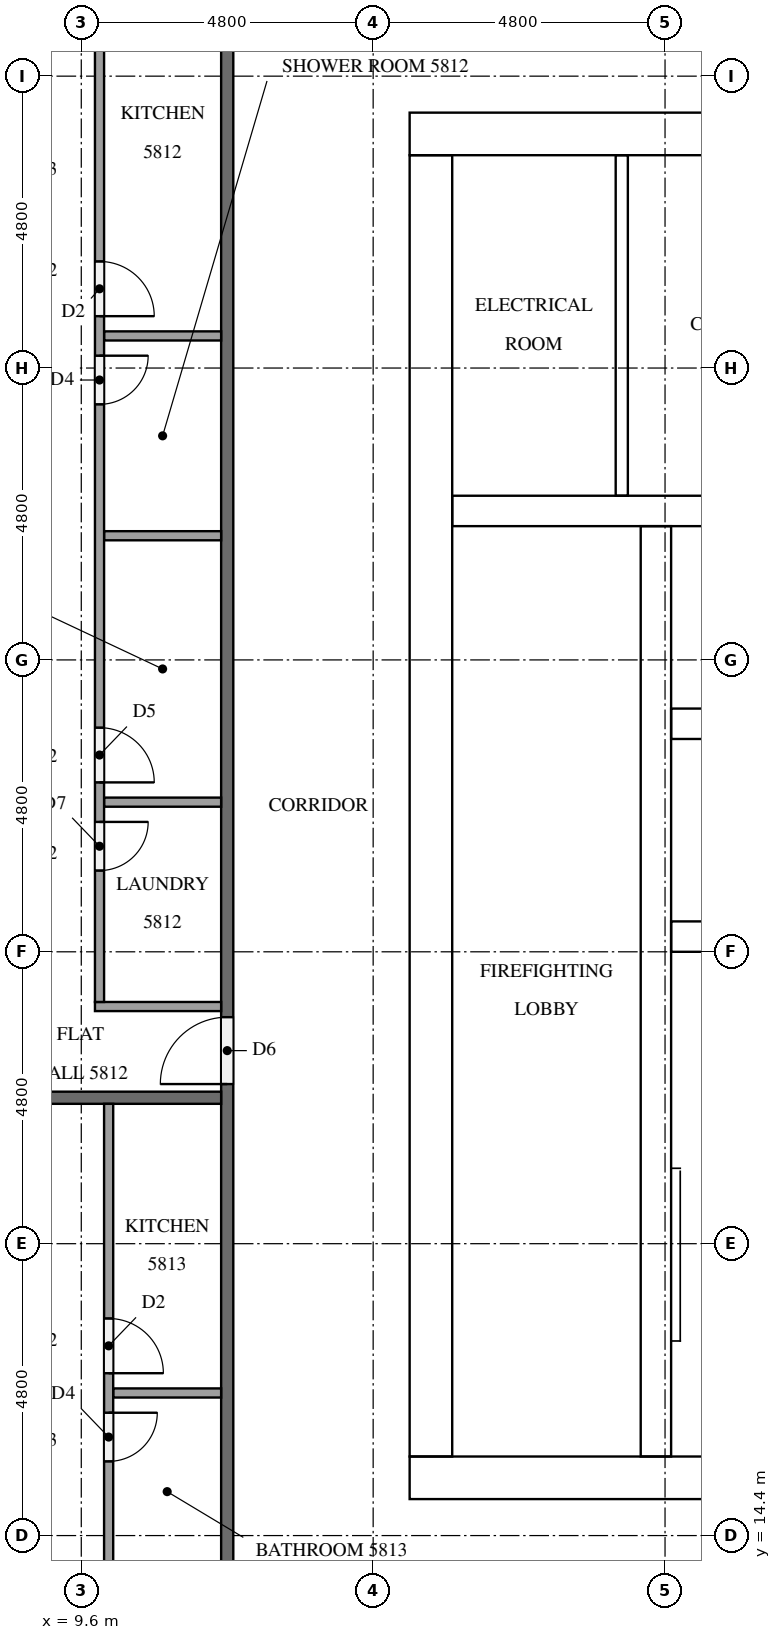
"""IFC4 building model, lengths in metres.
Left out: names, types, materials, properties, quantities, classifications, styles, units other than length and angle.
Written with IfcOpenShell. Run it as: python <this file> out.ifc"""

import sys

from ifc_helpers import new_model, si_unit, direction, frame, frame_2d, origin, place, context, subcontext, project, spatial, rectangle, extrude, element, fill, save


model = new_model("IFC4")
c1 = context("Model", 3, precision=1e-05, world=origin(), true_north=direction((0.0, 1.0)))
c2 = subcontext(c1, "Body", "Model", "MODEL_VIEW")
j1 = project(units=[si_unit("LENGTHUNIT", "METRE"), si_unit("PLANEANGLEUNIT", "RADIAN")], contexts=[c1])
p1 = place(None, origin())
s1 = spatial("IfcSite", under=j1, at=p1, CompositionType="ELEMENT")
p2 = place(p1, origin())
s2 = spatial("IfcBuilding", under=s1, at=p2, CompositionType="ELEMENT")
p3 = place(p2, frame((0.0, 0.0, 222.8)))
s3 = spatial("IfcBuildingStorey", under=s2, at=p3, CompositionType="ELEMENT", Elevation=222.8)
p4 = place(p3, frame((15.0, 15.35, 0.0), z_axis=(0.0, 0.0, 1.0), x_axis=(1.0, 0.0, 0.0)))
e1 = element("IfcWall", 1, at=p4, inside=s3, PredefinedType="SHEAR", context=c2, shape_type="SweptSolid", body=[
    extrude(rectangle(XDim=32.4, YDim=0.7, at=frame_2d((16.2, 0.0))), origin(), (0.0, 0.0, 1.0), 3.2),
])
p5 = place(p4, frame((15.3, 0.0, 0.0)))
e2 = element("IfcOpeningElement", 2, at=p5, cuts=e1, PredefinedType="OPENING", context=c2, shape_type="SweptSolid", body=[
    extrude(rectangle(XDim=1.8, YDim=2.1, at=frame_2d((0.9, 1.05))), frame((0.0, 0.36, 0.0), z_axis=(0.0, -1.0, 0.0), x_axis=(1.0, 0.0, 0.0)), (0.0, 0.0, 1.0), 0.72),
])
p6 = place(p3, frame((15.0, 37.45, 0.0), z_axis=(0.0, 0.0, 1.0), x_axis=(1.0, 0.0, 0.0)))
e3 = element("IfcWall", 3, at=p6, inside=s3, PredefinedType="SHEAR", context=c2, shape_type="SweptSolid", body=[
    extrude(rectangle(XDim=32.4, YDim=0.7, at=frame_2d((16.2, 0.0))), origin(), (0.0, 0.0, 1.0), 3.2),
])
p7 = place(p6, frame((15.3, 0.0, 0.0)))
e4 = element("IfcOpeningElement", 4, at=p7, cuts=e3, PredefinedType="OPENING", context=c2, shape_type="SweptSolid", body=[
    extrude(rectangle(XDim=1.8, YDim=2.1, at=frame_2d((0.9, 1.05))), frame((0.0, 0.36, 0.0), z_axis=(0.0, -1.0, 0.0), x_axis=(1.0, 0.0, 0.0)), (0.0, 0.0, 1.0), 0.72),
])
p8 = place(p6, frame((1.544, 0.0, 0.0)))
e5 = element("IfcOpeningElement", 5, at=p8, cuts=e3, PredefinedType="OPENING", context=c2, shape_type="SweptSolid", body=[
    extrude(rectangle(XDim=1.0, YDim=2.1, at=frame_2d((0.5, 1.05))), frame((0.0, 0.36, 0.0), z_axis=(0.0, -1.0, 0.0), x_axis=(1.0, 0.0, 0.0)), (0.0, 0.0, 1.0), 0.72),
])
p9 = place(p6, frame((5.219, 0.0, 0.0)))
e6 = element("IfcOpeningElement", 6, at=p9, cuts=e3, PredefinedType="OPENING", context=c2, shape_type="SweptSolid", body=[
    extrude(rectangle(XDim=1.0, YDim=2.1, at=frame_2d((0.5, 1.05))), frame((0.0, 0.36, 0.0), z_axis=(0.0, -1.0, 0.0), x_axis=(1.0, 0.0, 0.0)), (0.0, 0.0, 1.0), 0.72),
])
p10 = place(p3, frame((15.35, 15.7, 0.0), z_axis=(0.0, 0.0, 1.0), x_axis=(0.0, 1.0, 0.0)))
e7 = element("IfcWall", 7, at=p10, inside=s3, PredefinedType="SHEAR", context=c2, shape_type="SweptSolid", body=[
    extrude(rectangle(XDim=21.4, YDim=0.7, at=frame_2d((10.7, 0.0))), origin(), (0.0, 0.0, 1.0), 3.2),
])
p11 = place(p10, frame((5.06, 0.0, 0.0)))
e8 = element("IfcOpeningElement", 8, at=p11, cuts=e7, PredefinedType="OPENING", context=c2, shape_type="SweptSolid", body=[
    extrude(rectangle(XDim=1.2, YDim=2.1, at=frame_2d((0.6, 1.05))), frame((0.0, 0.36, 0.0), z_axis=(0.0, -1.0, 0.0), x_axis=(1.0, 0.0, 0.0)), (0.0, 0.0, 1.0), 0.72),
])
p12 = place(p3, frame((19.05, 15.7, 0.0), z_axis=(0.0, 0.0, 1.0), x_axis=(0.0, 1.0, 0.0)))
e9 = element("IfcWall", 9, at=p12, inside=s3, PredefinedType="SHEAR", context=c2, shape_type="SweptSolid", body=[
    extrude(rectangle(XDim=15.3, YDim=0.5, at=frame_2d((7.65, 0.0))), origin(), (0.0, 0.0, 1.0), 3.2),
])
p13 = place(p12, frame((9.75, 0.0, 0.0)))
e10 = element("IfcOpeningElement", 10, at=p13, cuts=e9, PredefinedType="OPENING", context=c2, shape_type="SweptSolid", body=[
    extrude(rectangle(XDim=1.1, YDim=2.1, at=frame_2d((0.55, 1.05))), frame((0.0, 0.26, 0.0), z_axis=(0.0, -1.0, 0.0), x_axis=(1.0, 0.0, 0.0)), (0.0, 0.0, 1.0), 0.52),
])
p14 = place(p12, frame((13.25, 0.0, 0.0)))
e11 = element("IfcOpeningElement", 11, at=p14, cuts=e9, PredefinedType="OPENING", context=c2, shape_type="SweptSolid", body=[
    extrude(rectangle(XDim=1.1, YDim=2.1, at=frame_2d((0.55, 1.05))), frame((0.0, 0.26, 0.0), z_axis=(0.0, -1.0, 0.0), x_axis=(1.0, 0.0, 0.0)), (0.0, 0.0, 1.0), 0.52),
])
p15 = place(p12, frame((0.5, 0.0, 0.0)))
e12 = element("IfcOpeningElement", 12, at=p15, cuts=e9, PredefinedType="OPENING", context=c2, shape_type="SweptSolid", body=[
    extrude(rectangle(XDim=1.2, YDim=2.1, at=frame_2d((0.6, 1.05))), frame((0.0, 0.26, 0.0), z_axis=(0.0, -1.0, 0.0), x_axis=(1.0, 0.0, 0.0)), (0.0, 0.0, 1.0), 0.52),
])
for number, where, z_axis, x_axis in (
    (13, (19.3, 24.25, 0.0), (0.0, 0.0, 1.0), (1.0, 0.0, 0.0)),
    (14, (19.3, 27.75, 0.0), (0.0, 0.0, 1.0), (1.0, 0.0, 0.0)),
):
    element("IfcWall", number, at=place(p3, frame(where, z_axis=z_axis, x_axis=x_axis)), inside=s3, PredefinedType="SHEAR", context=c2, shape_type="SweptSolid", body=[
        extrude(rectangle(XDim=3.55, YDim=0.5, at=frame_2d((1.775, 0.0))), origin(), (0.0, 0.0, 1.0), 3.2),
    ])
p16 = place(p3, frame((15.7, 31.25, 0.0), z_axis=(0.0, 0.0, 1.0), x_axis=(1.0, 0.0, 0.0)))
e15 = element("IfcWall", 15, at=p16, inside=s3, PredefinedType="SHEAR", context=c2, shape_type="SweptSolid", body=[
    extrude(rectangle(XDim=7.15, YDim=0.5, at=frame_2d((3.575, 0.0))), origin(), (0.0, 0.0, 1.0), 3.2),
])
p17 = place(p3, frame((18.489, 31.5, 0.0), z_axis=(0.0, 0.0, 1.0), x_axis=(0.0, 1.0, 0.0)))
e16 = element("IfcWall", 16, at=p17, inside=s3, PredefinedType="PARTITIONING", context=c2, shape_type="SweptSolid", body=[
    extrude(rectangle(XDim=5.6, YDim=0.2, at=frame_2d((2.8, 0.0))), origin(), (0.0, 0.0, 1.0), 3.2),
])
p18 = place(p3, frame((12.0, 12.1, 0.0), z_axis=(0.0, 0.0, 1.0), x_axis=(0.0, 1.0, 0.0)))
e17 = element("IfcWall", 17, at=p18, inside=s3, PredefinedType="PARTITIONING", context=c2, shape_type="SweptSolid", body=[
    extrude(rectangle(XDim=28.6, YDim=0.2, at=frame_2d((14.3, 0.0))), origin(), (0.0, 0.0, 1.0), 3.2),
])
p19 = place(p18, frame((9.725, 0.0, 0.0)))
e18 = element("IfcOpeningElement", 18, at=p19, cuts=e17, PredefinedType="OPENING", context=c2, shape_type="SweptSolid", body=[
    extrude(rectangle(XDim=1.1, YDim=2.1, at=frame_2d((0.55, 1.05))), frame((0.0, 0.11, 0.0), z_axis=(0.0, -1.0, 0.0), x_axis=(1.0, 0.0, 0.0)), (0.0, 0.0, 1.0), 0.22),
])
p20 = place(p18, frame((0.175, 0.0, 0.0)))
e19 = element("IfcOpeningElement", 19, at=p20, cuts=e17, PredefinedType="OPENING", context=c2, shape_type="SweptSolid", body=[
    extrude(rectangle(XDim=1.0, YDim=2.1, at=frame_2d((0.5, 1.05))), frame((0.0, 0.11, 0.0), z_axis=(0.0, -1.0, 0.0), x_axis=(1.0, 0.0, 0.0)), (0.0, 0.0, 1.0), 0.22),
])
p21 = place(p3, frame((4.9, 21.6, 0.0), z_axis=(0.0, 0.0, 1.0), x_axis=(1.0, 0.0, 0.0)))
e20 = element("IfcWall", 20, at=p21, inside=s3, PredefinedType="PARTITIONING", context=c2, shape_type="SweptSolid", body=[
    extrude(rectangle(XDim=7.0, YDim=0.2, at=frame_2d((3.5, 0.0))), origin(), (0.0, 0.0, 1.0), 3.2),
])
for number, where, z_axis, x_axis in (
    (21, (11.9, 26.461, 0.0), (0.0, 0.0, 1.0), (-1.0, 0.0, 0.0)),
    (22, (11.9, 30.842, 0.0), (0.0, 0.0, 1.0), (-1.0, 0.0, 0.0)),
    (23, (11.9, 34.128, 0.0), (0.0, 0.0, 1.0), (-1.0, 0.0, 0.0)),
):
    element("IfcWall", number, at=place(p3, frame(where, z_axis=z_axis, x_axis=x_axis)), inside=s3, PredefinedType="PARTITIONING", context=c2, shape_type="SweptSolid", body=[
        extrude(rectangle(XDim=1.925, YDim=0.15, at=frame_2d((0.962, 0.0))), origin(), (0.0, 0.0, 1.0), 3.2),
    ])
p22 = place(p3, frame((11.9, 23.1, 0.0), z_axis=(0.0, 0.0, 1.0), x_axis=(-1.0, 0.0, 0.0)))
e24 = element("IfcWall", 24, at=p22, inside=s3, PredefinedType="PARTITIONING", context=c2, shape_type="SweptSolid", body=[
    extrude(rectangle(XDim=2.075, YDim=0.15, at=frame_2d((1.038, 0.0))), origin(), (0.0, 0.0, 1.0), 3.2),
])
p23 = place(p3, frame((9.9, 40.7, 0.0), z_axis=(0.0, 0.0, 1.0), x_axis=(0.0, -1.0, 0.0)))
e25 = element("IfcWall", 25, at=p23, inside=s3, PredefinedType="PARTITIONING", context=c2, shape_type="SweptSolid", body=[
    extrude(rectangle(XDim=17.525, YDim=0.15, at=frame_2d((8.762, 0.0))), origin(), (0.0, 0.0, 1.0), 3.2),
])
p24 = place(p23, frame((14.564, 0.0, 0.0)))
e26 = element("IfcOpeningElement", 26, at=p24, cuts=e25, PredefinedType="OPENING", context=c2, shape_type="SweptSolid", body=[
    extrude(rectangle(XDim=0.8, YDim=2.1, at=frame_2d((0.4, 1.05))), frame((0.0, 0.085, 0.0), z_axis=(0.0, -1.0, 0.0), x_axis=(1.0, 0.0, 0.0)), (0.0, 0.0, 1.0), 0.17),
])
p25 = place(p23, frame((13.014, 0.0, 0.0)))
e27 = element("IfcOpeningElement", 27, at=p25, cuts=e25, PredefinedType="OPENING", context=c2, shape_type="SweptSolid", body=[
    extrude(rectangle(XDim=0.9, YDim=2.1, at=frame_2d((0.45, 1.05))), frame((0.0, 0.085, 0.0), z_axis=(0.0, -1.0, 0.0), x_axis=(1.0, 0.0, 0.0)), (0.0, 0.0, 1.0), 0.17),
])
p26 = place(p23, frame((6.897, 0.0, 0.0)))
e28 = element("IfcOpeningElement", 28, at=p26, cuts=e25, PredefinedType="OPENING", context=c2, shape_type="SweptSolid", body=[
    extrude(rectangle(XDim=0.8, YDim=2.1, at=frame_2d((0.4, 1.05))), frame((0.0, 0.085, 0.0), z_axis=(0.0, -1.0, 0.0), x_axis=(1.0, 0.0, 0.0)), (0.0, 0.0, 1.0), 0.17),
])
p27 = place(p23, frame((5.347, 0.0, 0.0)))
e29 = element("IfcOpeningElement", 29, at=p27, cuts=e25, PredefinedType="OPENING", context=c2, shape_type="SweptSolid", body=[
    extrude(rectangle(XDim=0.9, YDim=2.1, at=frame_2d((0.45, 1.05))), frame((0.0, 0.085, 0.0), z_axis=(0.0, -1.0, 0.0), x_axis=(1.0, 0.0, 0.0)), (0.0, 0.0, 1.0), 0.17),
])
p28 = place(p3, frame((11.9, 16.745, 0.0), z_axis=(0.0, 0.0, 1.0), x_axis=(-1.0, 0.0, 0.0)))
e30 = element("IfcWall", 30, at=p28, inside=s3, PredefinedType="PARTITIONING", context=c2, shape_type="SweptSolid", body=[
    extrude(rectangle(XDim=1.775, YDim=0.15, at=frame_2d((0.887, 0.0))), origin(), (0.0, 0.0, 1.0), 3.2),
])
p29 = place(p3, frame((10.05, 21.5, 0.0), z_axis=(0.0, 0.0, 1.0), x_axis=(0.0, -1.0, 0.0)))
e31 = element("IfcWall", 31, at=p29, inside=s3, PredefinedType="PARTITIONING", context=c2, shape_type="SweptSolid", body=[
    extrude(rectangle(XDim=7.925, YDim=0.15, at=frame_2d((3.962, 0.0))), origin(), (0.0, 0.0, 1.0), 3.2),
])
p30 = place(p29, frame((5.08, 0.0, 0.0)))
e32 = element("IfcOpeningElement", 32, at=p30, cuts=e31, PredefinedType="OPENING", context=c2, shape_type="SweptSolid", body=[
    extrude(rectangle(XDim=0.8, YDim=2.1, at=frame_2d((0.4, 1.05))), frame((0.0, 0.085, 0.0), z_axis=(0.0, -1.0, 0.0), x_axis=(1.0, 0.0, 0.0)), (0.0, 0.0, 1.0), 0.17),
])
p31 = place(p29, frame((3.53, 0.0, 0.0)))
e33 = element("IfcOpeningElement", 33, at=p31, cuts=e31, PredefinedType="OPENING", context=c2, shape_type="SweptSolid", body=[
    extrude(rectangle(XDim=0.9, YDim=2.1, at=frame_2d((0.45, 1.05))), frame((0.0, 0.085, 0.0), z_axis=(0.0, -1.0, 0.0), x_axis=(1.0, 0.0, 0.0)), (0.0, 0.0, 1.0), 0.17),
])
p32 = place(p13, origin())
e34 = element("IfcDoor", 34, at=p32, inside=s3, OperationType="DOUBLE_DOOR_SLIDING", PredefinedType="DOOR", context=c2, shape_type="SweptSolid", body=[
    extrude(rectangle(XDim=1.1, YDim=2.1, at=frame_2d((0.55, 1.05))), frame((0.0, 0.025, 0.0), z_axis=(0.0, -1.0, 0.0), x_axis=(1.0, 0.0, 0.0)), (0.0, 0.0, 1.0), 0.05),
])
fill(e10, e34)
p33 = place(p14, origin())
e35 = element("IfcDoor", 35, at=p33, inside=s3, OperationType="DOUBLE_DOOR_SLIDING", PredefinedType="DOOR", context=c2, shape_type="SweptSolid", body=[
    extrude(rectangle(XDim=1.1, YDim=2.1, at=frame_2d((0.55, 1.05))), frame((0.0, 0.025, 0.0), z_axis=(0.0, -1.0, 0.0), x_axis=(1.0, 0.0, 0.0)), (0.0, 0.0, 1.0), 0.05),
])
fill(e11, e35)
p34 = place(p15, frame((1.2, 0.0, 0.0), z_axis=(0.0, 0.0, 1.0), x_axis=(-1.0, 0.0, 0.0)))
e36 = element("IfcDoor", 36, at=p34, inside=s3, OperationType="SINGLE_SWING_RIGHT", PredefinedType="DOOR", context=c2, shape_type="SweptSolid", body=[
    extrude(rectangle(XDim=1.2, YDim=2.1, at=frame_2d((0.6, 1.05))), frame((0.0, 0.025, 0.0), z_axis=(0.0, -1.0, 0.0), x_axis=(1.0, 0.0, 0.0)), (0.0, 0.0, 1.0), 0.05),
])
fill(e12, e36)
p35 = place(p11, frame((1.2, 0.0, 0.0), z_axis=(0.0, 0.0, 1.0), x_axis=(-1.0, 0.0, 0.0)))
e37 = element("IfcDoor", 37, at=p35, inside=s3, OperationType="SINGLE_SWING_LEFT", PredefinedType="DOOR", context=c2, shape_type="SweptSolid", body=[
    extrude(rectangle(XDim=1.2, YDim=2.1, at=frame_2d((0.6, 1.05))), frame((0.0, 0.025, 0.0), z_axis=(0.0, -1.0, 0.0), x_axis=(1.0, 0.0, 0.0)), (0.0, 0.0, 1.0), 0.05),
])
fill(e8, e37)
p36 = place(p8, origin())
e38 = element("IfcDoor", 38, at=p36, inside=s3, OperationType="SINGLE_SWING_LEFT", PredefinedType="DOOR", context=c2, shape_type="SweptSolid", body=[
    extrude(rectangle(XDim=1.0, YDim=2.1, at=frame_2d((0.5, 1.05))), frame((0.0, 0.025, 0.0), z_axis=(0.0, -1.0, 0.0), x_axis=(1.0, 0.0, 0.0)), (0.0, 0.0, 1.0), 0.05),
])
fill(e5, e38)
p37 = place(p19, origin())
e39 = element("IfcDoor", 39, at=p37, inside=s3, OperationType="SINGLE_SWING_LEFT", PredefinedType="DOOR", context=c2, shape_type="SweptSolid", body=[
    extrude(rectangle(XDim=1.1, YDim=2.1, at=frame_2d((0.55, 1.05))), frame((0.0, 0.025, 0.0), z_axis=(0.0, -1.0, 0.0), x_axis=(1.0, 0.0, 0.0)), (0.0, 0.0, 1.0), 0.05),
])
fill(e18, e39)
p38 = place(p24, origin())
e40 = element("IfcDoor", 40, at=p38, inside=s3, OperationType="SINGLE_SWING_LEFT", PredefinedType="DOOR", context=c2, shape_type="SweptSolid", body=[
    extrude(rectangle(XDim=0.8, YDim=2.1, at=frame_2d((0.4, 1.05))), frame((0.0, 0.025, 0.0), z_axis=(0.0, -1.0, 0.0), x_axis=(1.0, 0.0, 0.0)), (0.0, 0.0, 1.0), 0.05),
])
fill(e26, e40)
p39 = place(p25, origin())
e41 = element("IfcDoor", 41, at=p39, inside=s3, OperationType="SINGLE_SWING_RIGHT", PredefinedType="DOOR", context=c2, shape_type="SweptSolid", body=[
    extrude(rectangle(XDim=0.9, YDim=2.1, at=frame_2d((0.45, 1.05))), frame((0.0, 0.025, 0.0), z_axis=(0.0, -1.0, 0.0), x_axis=(1.0, 0.0, 0.0)), (0.0, 0.0, 1.0), 0.05),
])
fill(e27, e41)
p40 = place(p26, origin())
e42 = element("IfcDoor", 42, at=p40, inside=s3, OperationType="SINGLE_SWING_LEFT", PredefinedType="DOOR", context=c2, shape_type="SweptSolid", body=[
    extrude(rectangle(XDim=0.8, YDim=2.1, at=frame_2d((0.4, 1.05))), frame((0.0, 0.025, 0.0), z_axis=(0.0, -1.0, 0.0), x_axis=(1.0, 0.0, 0.0)), (0.0, 0.0, 1.0), 0.05),
])
fill(e28, e42)
p41 = place(p27, origin())
e43 = element("IfcDoor", 43, at=p41, inside=s3, OperationType="SINGLE_SWING_RIGHT", PredefinedType="DOOR", context=c2, shape_type="SweptSolid", body=[
    extrude(rectangle(XDim=0.9, YDim=2.1, at=frame_2d((0.45, 1.05))), frame((0.0, 0.025, 0.0), z_axis=(0.0, -1.0, 0.0), x_axis=(1.0, 0.0, 0.0)), (0.0, 0.0, 1.0), 0.05),
])
fill(e29, e43)
p42 = place(p30, origin())
e44 = element("IfcDoor", 44, at=p42, inside=s3, OperationType="SINGLE_SWING_LEFT", PredefinedType="DOOR", context=c2, shape_type="SweptSolid", body=[
    extrude(rectangle(XDim=0.8, YDim=2.1, at=frame_2d((0.4, 1.05))), frame((0.0, 0.025, 0.0), z_axis=(0.0, -1.0, 0.0), x_axis=(1.0, 0.0, 0.0)), (0.0, 0.0, 1.0), 0.05),
])
fill(e32, e44)
p43 = place(p31, origin())
e45 = element("IfcDoor", 45, at=p43, inside=s3, OperationType="SINGLE_SWING_RIGHT", PredefinedType="DOOR", context=c2, shape_type="SweptSolid", body=[
    extrude(rectangle(XDim=0.9, YDim=2.1, at=frame_2d((0.45, 1.05))), frame((0.0, 0.025, 0.0), z_axis=(0.0, -1.0, 0.0), x_axis=(1.0, 0.0, 0.0)), (0.0, 0.0, 1.0), 0.05),
])
fill(e33, e45)
save(model, sys.argv[1])
